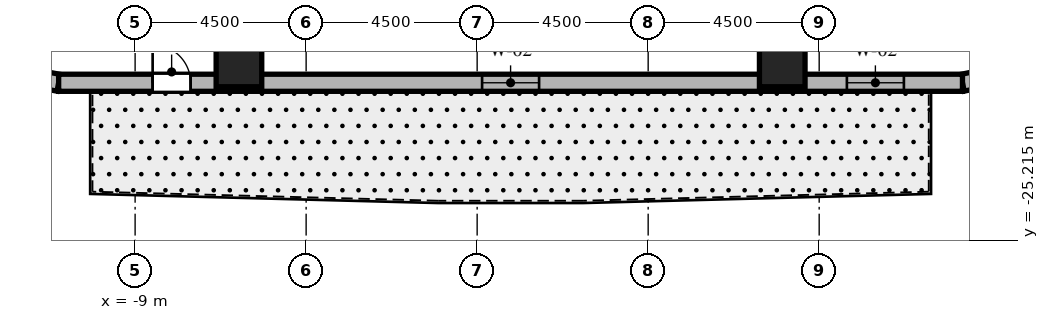
"""IFC4 building model, lengths in metres.
Left out: names, types, materials, properties, quantities, classifications, styles, units other than length and angle.
Written with IfcOpenShell. Run it as: python <this file> out.ifc"""

import sys

from ifc_helpers import new_model, si_unit, direction, frame, frame_2d, origin, origin_2d, place, context, subcontext, project, spatial, rectangle, extrude, element, fill, save


model = new_model("IFC4")
c1 = context("Model", 3, precision=1e-05, world=origin(), true_north=direction((0.0, 1.0)))
c2 = subcontext(c1, "Body", "Model", "MODEL_VIEW")
j1 = project(units=[si_unit("LENGTHUNIT", "METRE"), si_unit("PLANEANGLEUNIT", "RADIAN")], contexts=[c1])
p1 = place(None, origin())
s1 = spatial("IfcSite", under=j1, at=p1, CompositionType="ELEMENT")
p2 = place(p1, origin())
s2 = spatial("IfcBuilding", under=s1, at=p2, CompositionType="ELEMENT")
p3 = place(p2, frame((0.0, 0.0, 124.7)))
s3 = spatial("IfcBuildingStorey", under=s2, at=p3, CompositionType="ELEMENT", Elevation=124.7)
for number, where, z_axis, x_axis in (
    (1, (-6.268, -20.58, 0.0), (0.0, 0.0, 1.0), (1.0, 0.0, 0.0)),
    (2, (8.028, -20.58, 0.0), (0.0, 0.0, 1.0), (1.0, 0.0, 0.0)),
):
    element("IfcColumn", number, at=place(p3, frame(where, z_axis=z_axis, x_axis=x_axis)), inside=s3, PredefinedType="COLUMN", context=c2, shape_type="SweptSolid", body=[
        extrude(rectangle(XDim=1.2, YDim=1.2, at=origin_2d()), origin(), (0.0, 0.0, 1.0), 3.7),
    ])
p4 = place(p3, frame((-12.259, -20.84, 0.0), z_axis=(0.0, 0.0, 1.0), x_axis=(0.982730354425, -0.185043374624, 0.0)))
e3 = element("IfcWall", 3, at=p4, inside=s3, PredefinedType="SOLIDWALL", context=c2, shape_type="SweptSolid", body=[
    extrude(rectangle(XDim=1.269, YDim=0.45, at=frame_2d((0.635, 0.0))), origin(), (0.0, 0.0, 1.0), 3.4),
])
p5 = place(p3, frame((12.771, -21.075, 0.0), z_axis=(0.0, 0.0, 1.0), x_axis=(0.97874281988, 0.205091424819, 0.0)))
e4 = element("IfcWall", 4, at=p5, inside=s3, PredefinedType="SOLIDWALL", context=c2, shape_type="SweptSolid", body=[
    extrude(rectangle(XDim=1.406, YDim=0.45, at=frame_2d((0.703, 0.0))), origin(), (0.0, 0.0, 1.0), 3.4),
])
p6 = place(p3, frame((-11.012, -21.075, 0.0), z_axis=(0.0, 0.0, 1.0), x_axis=(1.0, 0.0, 0.0)))
e5 = element("IfcWall", 5, at=p6, inside=s3, PredefinedType="SOLIDWALL", context=c2, shape_type="SweptSolid", body=[
    extrude(rectangle(XDim=23.782, YDim=0.45, at=frame_2d((11.891, 0.0))), origin(), (0.0, 0.0, 1.0), 3.4),
])
p7 = place(p6, frame((2.473, 0.0, 0.0)))
e6 = element("IfcOpeningElement", 6, at=p7, cuts=e5, PredefinedType="OPENING", context=c2, shape_type="SweptSolid", body=[
    extrude(rectangle(XDim=1.0, YDim=2.15, at=frame_2d((0.5, 1.075))), frame((0.0, 0.235, 0.0), z_axis=(0.0, -1.0, 0.0), x_axis=(1.0, 0.0, 0.0)), (0.0, 0.0, 1.0), 0.47),
])
p8 = place(p6, frame((11.142, 0.0, 0.8)))
e7 = element("IfcOpeningElement", 7, at=p8, cuts=e5, PredefinedType="OPENING", context=c2, shape_type="SweptSolid", body=[
    extrude(rectangle(XDim=1.5, YDim=1.8, at=frame_2d((0.75, 0.9))), frame((0.0, 0.235, 0.0), z_axis=(0.0, -1.0, 0.0), x_axis=(1.0, 0.0, 0.0)), (0.0, 0.0, 1.0), 0.47),
])
p9 = place(p6, frame((20.741, 0.0, 0.8)))
e8 = element("IfcOpeningElement", 8, at=p9, cuts=e5, PredefinedType="OPENING", context=c2, shape_type="SweptSolid", body=[
    extrude(rectangle(XDim=1.5, YDim=1.8, at=frame_2d((0.75, 0.9))), frame((0.0, 0.235, 0.0), z_axis=(0.0, -1.0, 0.0), x_axis=(1.0, 0.0, 0.0)), (0.0, 0.0, 1.0), 0.47),
])
p10 = place(p3, frame((-3.0, -9.85, 0.0), z_axis=(0.0, 0.0, 1.0), x_axis=(-0.291352035382, -0.95661590593, 0.0)))
e9 = element("IfcWall", 9, at=p10, inside=s3, PredefinedType="PARTITIONING", context=c2, shape_type="SweptSolid", body=[
    extrude(rectangle(XDim=11.734, YDim=0.15, at=frame_2d((5.867, 0.0))), origin(), (0.0, 0.0, 1.0), 2.54),
])
p11 = place(p3, frame((3.842, -9.85, 0.0), z_axis=(0.0, 0.0, 1.0), x_axis=(0.363432685593, -0.931620460833, 0.0)))
e10 = element("IfcWall", 10, at=p11, inside=s3, PredefinedType="PARTITIONING", context=c2, shape_type="SweptSolid", body=[
    extrude(rectangle(XDim=12.049, YDim=0.15, at=frame_2d((6.024, 0.0))), origin(), (0.0, 0.0, 1.0), 2.54),
])
p12 = place(p7, origin())
e11 = element("IfcDoor", 11, at=p12, inside=s3, OperationType="SINGLE_SWING_LEFT", PredefinedType="DOOR", context=c2, shape_type="SweptSolid", body=[
    extrude(rectangle(XDim=1.0, YDim=2.15, at=frame_2d((0.5, 1.075))), frame((0.0, 0.025, 0.0), z_axis=(0.0, -1.0, 0.0), x_axis=(1.0, 0.0, 0.0)), (0.0, 0.0, 1.0), 0.05),
])
fill(e6, e11)
p13 = place(p8, origin())
e12 = element("IfcWindow", 12, at=p13, inside=s3, PartitioningType="SINGLE_PANEL", PredefinedType="WINDOW", context=c2, shape_type="SweptSolid", body=[
    extrude(rectangle(XDim=1.5, YDim=1.8, at=frame_2d((0.75, 0.9))), frame((0.0, 0.03, 0.0), z_axis=(0.0, -1.0, 0.0), x_axis=(1.0, 0.0, 0.0)), (0.0, 0.0, 1.0), 0.06),
])
fill(e7, e12)
p14 = place(p9, origin())
e13 = element("IfcWindow", 13, at=p14, inside=s3, PartitioningType="SINGLE_PANEL", PredefinedType="WINDOW", context=c2, shape_type="SweptSolid", body=[
    extrude(rectangle(XDim=1.5, YDim=1.8, at=frame_2d((0.75, 0.9))), frame((0.0, 0.03, 0.0), z_axis=(0.0, -1.0, 0.0), x_axis=(1.0, 0.0, 0.0)), (0.0, 0.0, 1.0), 0.06),
])
fill(e8, e13)
save(model, sys.argv[1])
